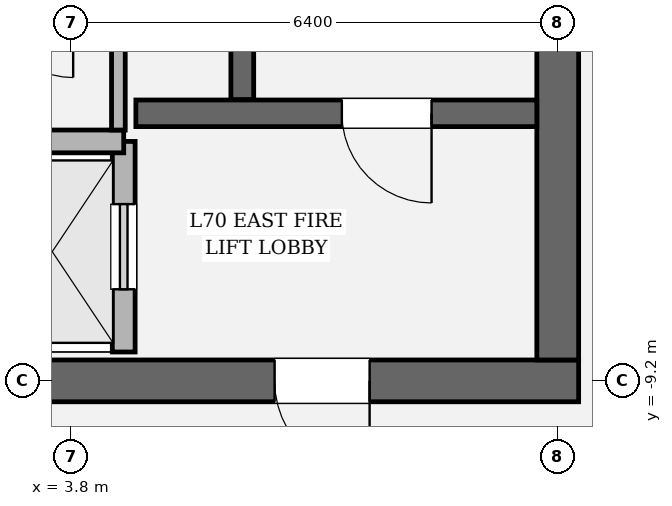
"""IFC4 building model, lengths in metres.
Left out: names, types, materials, properties, quantities, classifications, styles, units other than length and angle.
Written with IfcOpenShell. Run it as: python <this file> out.ifc"""

import sys

from ifc_helpers import new_model, si_unit, direction, frame, frame_2d, origin, place, context, subcontext, project, spatial, rectangle, extrude, element, fill, save


model = new_model("IFC4")
c1 = context("Model", 3, precision=1e-05, world=origin(), true_north=direction((0.0, 1.0)))
c2 = subcontext(c1, "Body", "Model", "MODEL_VIEW")
j1 = project(units=[si_unit("LENGTHUNIT", "METRE"), si_unit("PLANEANGLEUNIT", "RADIAN")], contexts=[c1])
p1 = place(None, origin())
s1 = spatial("IfcSite", under=j1, at=p1, CompositionType="ELEMENT")
p2 = place(p1, origin())
s2 = spatial("IfcBuilding", under=s1, at=p2, CompositionType="ELEMENT")
p3 = place(p2, frame((0.0, 0.0, 296.4)))
s3 = spatial("IfcBuildingStorey", under=s2, at=p3, CompositionType="ELEMENT", Elevation=296.4)
p4 = place(p3, frame((10.475, -9.2, 0.0), z_axis=(0.0, 0.0, 1.0), x_axis=(-1.0, 0.0, 0.0)))
e1 = element("IfcWall", 1, at=p4, inside=s3, PredefinedType="SHEAR", context=c2, shape_type="SweptSolid", body=[
    extrude(rectangle(XDim=20.95, YDim=0.55, at=frame_2d((10.475, 0.0))), origin(), (0.0, 0.0, 1.0), 4.2),
])
p5 = place(p4, frame((2.75, 0.0, 0.0)))
e2 = element("IfcOpeningElement", 2, at=p5, cuts=e1, PredefinedType="OPENING", context=c2, shape_type="SweptSolid", body=[
    extrude(rectangle(XDim=1.25, YDim=2.25, at=frame_2d((0.625, 1.125))), frame((0.0, 0.285, 0.0), z_axis=(0.0, -1.0, 0.0), x_axis=(1.0, 0.0, 0.0)), (0.0, 0.0, 1.0), 0.57),
])
p6 = place(p4, frame((16.95, 0.0, 0.0)))
e3 = element("IfcOpeningElement", 3, at=p6, cuts=e1, PredefinedType="OPENING", context=c2, shape_type="SweptSolid", body=[
    extrude(rectangle(XDim=1.25, YDim=2.25, at=frame_2d((0.625, 1.125))), frame((0.0, 0.285, 0.0), z_axis=(0.0, -1.0, 0.0), x_axis=(1.0, 0.0, 0.0)), (0.0, 0.0, 1.0), 0.57),
])
p7 = place(p3, frame((10.2, 8.925, 0.0), z_axis=(0.0, 0.0, 1.0), x_axis=(0.0, -1.0, 0.0)))
e4 = element("IfcWall", 4, at=p7, inside=s3, PredefinedType="SHEAR", context=c2, shape_type="SweptSolid", body=[
    extrude(rectangle(XDim=17.85, YDim=0.55, at=frame_2d((8.925, 0.0))), origin(), (0.0, 0.0, 1.0), 4.2),
])
p8 = place(p7, frame((3.955, 0.0, 0.0)))
e5 = element("IfcOpeningElement", 5, at=p8, cuts=e4, PredefinedType="OPENING", context=c2, shape_type="SweptSolid", body=[
    extrude(rectangle(XDim=1.18, YDim=2.2, at=frame_2d((0.59, 1.1))), frame((0.0, 0.285, 0.0), z_axis=(0.0, -1.0, 0.0), x_axis=(1.0, 0.0, 0.0)), (0.0, 0.0, 1.0), 0.57),
])
p9 = place(p3, frame((6.05, 3.45, 0.0), z_axis=(0.0, 0.0, 1.0), x_axis=(0.0, -1.0, 0.0)))
e6 = element("IfcWall", 6, at=p9, inside=s3, PredefinedType="SOLIDWALL", context=c2, shape_type="SweptSolid", body=[
    extrude(rectangle(XDim=8.95, YDim=0.3, at=frame_2d((4.475, 0.0))), origin(), (0.0, 0.0, 1.0), 4.2),
])
p10 = place(p3, frame((4.65, -5.68, 0.0), z_axis=(0.0, 0.0, 1.0), x_axis=(1.0, 0.0, 0.0)))
e7 = element("IfcWall", 7, at=p10, inside=s3, PredefinedType="SOLIDWALL", context=c2, shape_type="SweptSolid", body=[
    extrude(rectangle(XDim=5.275, YDim=0.35, at=frame_2d((2.638, 0.0))), origin(), (0.0, 0.0, 1.0), 4.2),
])
p11 = place(p10, frame((2.71, 0.0, 0.0)))
e8 = element("IfcOpeningElement", 8, at=p11, cuts=e7, PredefinedType="OPENING", context=c2, shape_type="SweptSolid", body=[
    extrude(rectangle(XDim=1.18, YDim=2.2, at=frame_2d((0.59, 1.1))), frame((0.0, 0.185, 0.0), z_axis=(0.0, -1.0, 0.0), x_axis=(1.0, 0.0, 0.0)), (0.0, 0.0, 1.0), 0.37),
])
p12 = place(p3, frame((4.49, -8.82, 0.0), z_axis=(0.0, 0.0, 1.0), x_axis=(0.0, 1.0, 0.0)))
e9 = element("IfcWall", 9, at=p12, inside=s3, PredefinedType="SOLIDWALL", context=c2, shape_type="SweptSolid", body=[
    extrude(rectangle(XDim=2.77, YDim=0.3, at=frame_2d((1.385, 0.0))), origin(), (0.0, 0.0, 1.0), 4.0),
])
p13 = place(p12, frame((0.825, 0.0, 0.0)))
e10 = element("IfcOpeningElement", 10, at=p13, cuts=e9, PredefinedType="OPENING", context=c2, shape_type="SweptSolid", body=[
    extrude(rectangle(XDim=1.12, YDim=2.25, at=frame_2d((0.56, 1.125))), frame((0.0, 0.16, 0.0), z_axis=(0.0, -1.0, 0.0), x_axis=(1.0, 0.0, 0.0)), (0.0, 0.0, 1.0), 0.32),
])
p14 = place(p3, frame((2.61, -6.05, 0.0), z_axis=(0.0, 0.0, 1.0), x_axis=(1.0, 0.0, 0.0)))
e11 = element("IfcWall", 11, at=p14, inside=s3, PredefinedType="SOLIDWALL", context=c2, shape_type="SweptSolid", body=[
    extrude(rectangle(XDim=1.88, YDim=0.3, at=frame_2d((0.94, 0.0))), origin(), (0.0, 0.0, 1.0), 4.0),
])
p15 = place(p3, frame((4.42, -5.9, 0.0), z_axis=(0.0, 0.0, 1.0), x_axis=(0.0, 1.0, 0.0)))
e12 = element("IfcWall", 12, at=p15, inside=s3, PredefinedType="PARTITIONING", context=c2, shape_type="SweptSolid", body=[
    extrude(rectangle(XDim=1.74, YDim=0.18, at=frame_2d((0.87, 0.0))), origin(), (0.0, 0.0, 1.0), 4.0),
])
p16 = place(p11, origin())
e13 = element("IfcDoor", 13, at=p16, inside=s3, OperationType="SINGLE_SWING_RIGHT", PredefinedType="DOOR", context=c2, shape_type="SweptSolid", body=[
    extrude(rectangle(XDim=1.18, YDim=2.2, at=frame_2d((0.59, 1.1))), frame((0.0, 0.025, 0.0), z_axis=(0.0, -1.0, 0.0), x_axis=(1.0, 0.0, 0.0)), (0.0, 0.0, 1.0), 0.05),
])
fill(e8, e13)
p17 = place(p5, origin())
e14 = element("IfcDoor", 14, at=p17, inside=s3, OperationType="SINGLE_SWING_LEFT", PredefinedType="DOOR", context=c2, shape_type="SweptSolid", body=[
    extrude(rectangle(XDim=1.25, YDim=2.25, at=frame_2d((0.625, 1.125))), frame((0.0, 0.025, 0.0), z_axis=(0.0, -1.0, 0.0), x_axis=(1.0, 0.0, 0.0)), (0.0, 0.0, 1.0), 0.05),
])
fill(e2, e14)
p18 = place(p13, origin())
e15 = element("IfcDoor", 15, at=p18, inside=s3, OperationType="SLIDING_TO_RIGHT", PredefinedType="DOOR", context=c2, shape_type="SweptSolid", body=[
    extrude(rectangle(XDim=1.12, YDim=2.25, at=frame_2d((0.56, 1.125))), frame((0.0, 0.025, 0.0), z_axis=(0.0, -1.0, 0.0), x_axis=(1.0, 0.0, 0.0)), (0.0, 0.0, 1.0), 0.05),
])
fill(e10, e15)
save(model, sys.argv[1])
